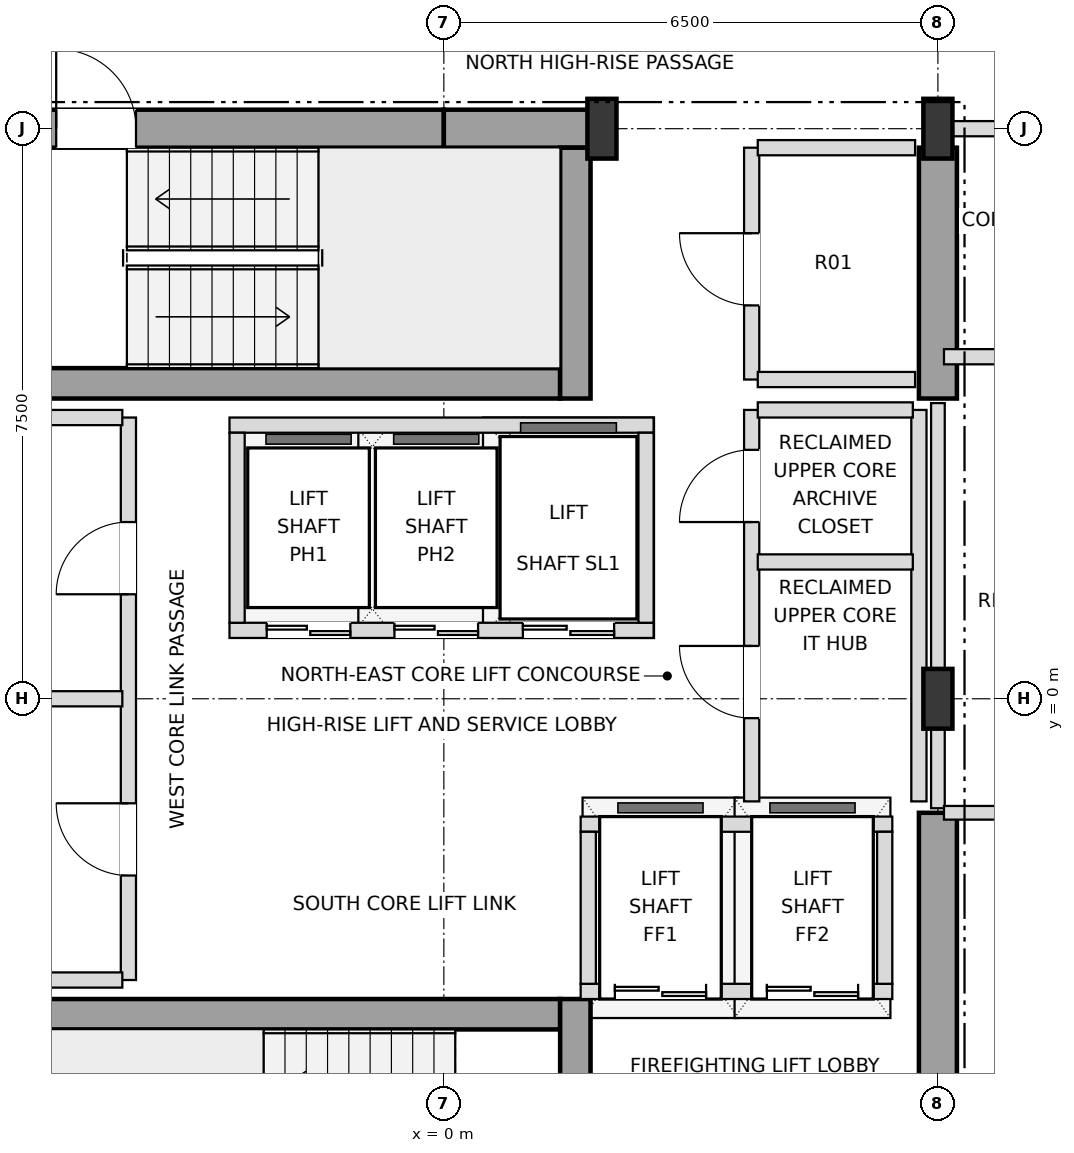
"""IFC4 building model, lengths in metres.
Left out: names, types, materials, properties, quantities, classifications, styles, units other than length and angle.
Written with IfcOpenShell. Run it as: python <this file> out.ifc"""

import sys

from ifc_helpers import new_model, si_unit, direction, frame, frame_2d, origin, origin_2d, place, context, subcontext, project, spatial, rectangle, i_section, extrude, element, fill, save


model = new_model("IFC4")
c1 = context("Model", 3, precision=1e-05, world=origin(), true_north=direction((0.0, 1.0)))
c2 = subcontext(c1, "Body", "Model", "MODEL_VIEW")
j1 = project(units=[si_unit("LENGTHUNIT", "METRE"), si_unit("PLANEANGLEUNIT", "RADIAN")], contexts=[c1])
p1 = place(None, origin())
s1 = spatial("IfcSite", under=j1, at=p1, CompositionType="ELEMENT")
p2 = place(p1, origin())
s2 = spatial("IfcBuilding", under=s1, at=p2, CompositionType="ELEMENT")
p3 = place(p2, frame((0.0, 0.0, 258.3)))
s3 = spatial("IfcBuildingStorey", under=s2, at=p3, CompositionType="ELEMENT", Elevation=258.3)
for number, where, z_axis, x_axis in (
    (1, (6.5, 0.0, 0.0), (0.0, 0.0, 1.0), (1.0, 0.0, 0.0)),
    (2, (2.08, 7.5, 0.0), (0.0, 0.0, 1.0), (1.0, 0.0, 0.0)),
    (3, (6.5, 7.5, 0.0), (0.0, 0.0, 1.0), (1.0, 0.0, 0.0)),
):
    element("IfcColumn", number, at=place(p3, frame(where, z_axis=z_axis, x_axis=x_axis)), inside=s3, PredefinedType="COLUMN", context=c2, shape_type="SweptSolid", body=[
        extrude(i_section(OverallWidth=0.382, OverallDepth=0.786, WebThickness=0.02, FlangeThickness=0.033, at=origin_2d()), origin(), (0.0, 0.0, 1.0), 3.6),
    ])
p4 = place(p3, frame((-6.75, 7.5, 0.0), z_axis=(0.0, 0.0, 1.0), x_axis=(1.0, 0.0, 0.0)))
e4 = element("IfcWall", 4, at=p4, inside=s3, PredefinedType="SHEAR", context=c2, shape_type="SweptSolid", body=[
    extrude(rectangle(XDim=6.75, YDim=0.5, at=frame_2d((3.375, 0.0))), origin(), (0.0, 0.0, 1.0), 3.38),
])
p5 = place(p4, frame((1.65, 0.0, 0.0)))
e5 = element("IfcOpeningElement", 5, at=p5, cuts=e4, PredefinedType="OPENING", context=c2, shape_type="SweptSolid", body=[
    extrude(rectangle(XDim=1.05, YDim=2.15, at=frame_2d((0.525, 1.075))), frame((0.0, 0.26, 0.0), z_axis=(0.0, -1.0, 0.0), x_axis=(1.0, 0.0, 0.0)), (0.0, 0.0, 1.0), 0.52),
])
p6 = place(p3, frame((0.0, 7.5, 0.0), z_axis=(0.0, 0.0, 1.0), x_axis=(1.0, 0.0, 0.0)))
e6 = element("IfcWall", 6, at=p6, inside=s3, PredefinedType="SHEAR", context=c2, shape_type="SweptSolid", body=[
    extrude(rectangle(XDim=2.08, YDim=0.5, at=frame_2d((1.04, 0.0))), origin(), (0.0, 0.0, 1.0), 3.38),
])
p7 = place(p3, frame((6.5, -7.25, 0.0), z_axis=(0.0, 0.0, 1.0), x_axis=(0.0, 1.0, 0.0)))
e7 = element("IfcWall", 7, at=p7, inside=s3, PredefinedType="SHEAR", context=c2, shape_type="SweptSolid", body=[
    extrude(rectangle(XDim=5.75, YDim=0.5, at=frame_2d((2.875, 0.0))), origin(), (0.0, 0.0, 1.0), 3.38),
])
p8 = place(p7, frame((0.85, 0.0, 0.0)))
e8 = element("IfcOpeningElement", 8, at=p8, cuts=e7, PredefinedType="OPENING", context=c2, shape_type="SweptSolid", body=[
    extrude(rectangle(XDim=1.05, YDim=2.15, at=frame_2d((0.525, 1.075))), frame((0.0, 0.26, 0.0), z_axis=(0.0, -1.0, 0.0), x_axis=(1.0, 0.0, 0.0)), (0.0, 0.0, 1.0), 0.52),
])
p9 = place(p3, frame((6.5, 3.95, 0.0), z_axis=(0.0, 0.0, 1.0), x_axis=(0.0, 1.0, 0.0)))
e9 = element("IfcWall", 9, at=p9, inside=s3, PredefinedType="SHEAR", context=c2, shape_type="SweptSolid", body=[
    extrude(rectangle(XDim=3.3, YDim=0.5, at=frame_2d((1.65, 0.0))), origin(), (0.0, 0.0, 1.0), 3.38),
])
p10 = place(p3, frame((-6.25, -4.15, 0.0), z_axis=(0.0, 0.0, 1.0), x_axis=(1.0, 0.0, 0.0)))
e10 = element("IfcWall", 10, at=p10, inside=s3, PredefinedType="SHEAR", context=c2, shape_type="SweptSolid", body=[
    extrude(rectangle(XDim=7.78, YDim=0.4, at=frame_2d((3.89, 0.0))), origin(), (0.0, 0.0, 1.0), 3.38),
])
p11 = place(p3, frame((1.73, -7.25, 0.0), z_axis=(0.0, 0.0, 1.0), x_axis=(0.0, 1.0, 0.0)))
e11 = element("IfcWall", 11, at=p11, inside=s3, PredefinedType="SHEAR", context=c2, shape_type="SweptSolid", body=[
    extrude(rectangle(XDim=3.3, YDim=0.4, at=frame_2d((1.65, 0.0))), origin(), (0.0, 0.0, 1.0), 3.38),
])
p12 = place(p11, frame((0.9, 0.0, 0.0)))
e12 = element("IfcOpeningElement", 12, at=p12, cuts=e11, PredefinedType="OPENING", context=c2, shape_type="SweptSolid", body=[
    extrude(rectangle(XDim=1.05, YDim=2.15, at=frame_2d((0.525, 1.075))), frame((0.0, 0.21, 0.0), z_axis=(0.0, -1.0, 0.0), x_axis=(1.0, 0.0, 0.0)), (0.0, 0.0, 1.0), 0.42),
])
p13 = place(p3, frame((-5.55, 4.15, 0.0), z_axis=(0.0, 0.0, 1.0), x_axis=(1.0, 0.0, 0.0)))
e13 = element("IfcWall", 13, at=p13, inside=s3, PredefinedType="SHEAR", context=c2, shape_type="SweptSolid", body=[
    extrude(rectangle(XDim=7.08, YDim=0.4, at=frame_2d((3.54, 0.0))), origin(), (0.0, 0.0, 1.0), 3.38),
])
p14 = place(p3, frame((1.73, 3.95, 0.0), z_axis=(0.0, 0.0, 1.0), x_axis=(0.0, 1.0, 0.0)))
e14 = element("IfcWall", 14, at=p14, inside=s3, PredefinedType="SHEAR", context=c2, shape_type="SweptSolid", body=[
    extrude(rectangle(XDim=3.3, YDim=0.4, at=frame_2d((1.65, 0.0))), origin(), (0.0, 0.0, 1.0), 3.38),
])
p15 = place(p3, frame((-2.82, 0.9, 0.0), z_axis=(0.0, 0.0, 1.0), x_axis=(1.0, 0.0, 0.0)))
e15 = element("IfcWall", 15, at=p15, inside=s3, PredefinedType="SOLIDWALL", context=c2, shape_type="SweptSolid", body=[
    extrude(rectangle(XDim=5.58, YDim=0.2, at=frame_2d((2.79, 0.0))), origin(), (0.0, 0.0, 1.0), 3.38),
])
p16 = place(p15, frame((0.49, 0.0, 0.0)))
e16 = element("IfcOpeningElement", 16, at=p16, cuts=e15, PredefinedType="OPENING", context=c2, shape_type="SweptSolid", body=[
    extrude(rectangle(XDim=1.1, YDim=2.15, at=frame_2d((0.55, 1.075))), frame((0.0, 0.11, 0.0), z_axis=(0.0, -1.0, 0.0), x_axis=(1.0, 0.0, 0.0)), (0.0, 0.0, 1.0), 0.22),
])
p17 = place(p15, frame((2.17, 0.0, 0.0)))
e17 = element("IfcOpeningElement", 17, at=p17, cuts=e15, PredefinedType="OPENING", context=c2, shape_type="SweptSolid", body=[
    extrude(rectangle(XDim=1.1, YDim=2.15, at=frame_2d((0.55, 1.075))), frame((0.0, 0.11, 0.0), z_axis=(0.0, -1.0, 0.0), x_axis=(1.0, 0.0, 0.0)), (0.0, 0.0, 1.0), 0.22),
])
p18 = place(p15, frame((3.86, 0.0, 0.0)))
e18 = element("IfcOpeningElement", 18, at=p18, cuts=e15, PredefinedType="OPENING", context=c2, shape_type="SweptSolid", body=[
    extrude(rectangle(XDim=1.2, YDim=2.2, at=frame_2d((0.6, 1.1))), frame((0.0, 0.11, 0.0), z_axis=(0.0, -1.0, 0.0), x_axis=(1.0, 0.0, 0.0)), (0.0, 0.0, 1.0), 0.22),
])
p19 = place(p3, frame((-2.82, 3.6, 0.0), z_axis=(0.0, 0.0, 1.0), x_axis=(1.0, 0.0, 0.0)))
e19 = element("IfcWall", 19, at=p19, inside=s3, PredefinedType="SOLIDWALL", context=c2, shape_type="SweptSolid", body=[
    extrude(rectangle(XDim=5.58, YDim=0.2, at=frame_2d((2.79, 0.0))), origin(), (0.0, 0.0, 1.0), 3.38),
])
for number, where, z_axis, x_axis in (
    (20, (-2.72, 1.0, 0.0), (0.0, 0.0, 1.0), (0.0, 1.0, 0.0)),
    (21, (2.66, 1.0, 0.0), (0.0, 0.0, 1.0), (0.0, 1.0, 0.0)),
):
    element("IfcWall", number, at=place(p3, frame(where, z_axis=z_axis, x_axis=x_axis)), inside=s3, PredefinedType="SOLIDWALL", context=c2, shape_type="SweptSolid", body=[
        extrude(rectangle(XDim=2.5, YDim=0.2, at=frame_2d((1.25, 0.0))), origin(), (0.0, 0.0, 1.0), 3.38),
    ])
p20 = place(p3, frame((1.8, -3.85, 0.0), z_axis=(0.0, 0.0, 1.0), x_axis=(1.0, 0.0, 0.0)))
e22 = element("IfcWall", 22, at=p20, inside=s3, PredefinedType="SOLIDWALL", context=c2, shape_type="SweptSolid", body=[
    extrude(rectangle(XDim=4.1, YDim=0.2, at=frame_2d((2.05, 0.0))), origin(), (0.0, 0.0, 1.0), 3.38),
])
p21 = place(p20, frame((0.45, 0.0, 0.0)))
e23 = element("IfcOpeningElement", 23, at=p21, cuts=e22, PredefinedType="OPENING", context=c2, shape_type="SweptSolid", body=[
    extrude(rectangle(XDim=1.2, YDim=2.2, at=frame_2d((0.6, 1.1))), frame((0.0, 0.11, 0.0), z_axis=(0.0, -1.0, 0.0), x_axis=(1.0, 0.0, 0.0)), (0.0, 0.0, 1.0), 0.22),
])
p22 = place(p20, frame((2.45, 0.0, 0.0)))
e24 = element("IfcOpeningElement", 24, at=p22, cuts=e22, PredefinedType="OPENING", context=c2, shape_type="SweptSolid", body=[
    extrude(rectangle(XDim=1.2, YDim=2.2, at=frame_2d((0.6, 1.1))), frame((0.0, 0.11, 0.0), z_axis=(0.0, -1.0, 0.0), x_axis=(1.0, 0.0, 0.0)), (0.0, 0.0, 1.0), 0.22),
])
p23 = place(p3, frame((1.8, -1.65, 0.0), z_axis=(0.0, 0.0, 1.0), x_axis=(1.0, 0.0, 0.0)))
e25 = element("IfcWall", 25, at=p23, inside=s3, PredefinedType="SOLIDWALL", context=c2, shape_type="SweptSolid", body=[
    extrude(rectangle(XDim=4.1, YDim=0.2, at=frame_2d((2.05, 0.0))), origin(), (0.0, 0.0, 1.0), 3.38),
])
for number, where, z_axis, x_axis in (
    (26, (1.9, -3.75, 0.0), (0.0, 0.0, 1.0), (0.0, 1.0, 0.0)),
    (27, (5.8, -3.75, 0.0), (0.0, 0.0, 1.0), (0.0, 1.0, 0.0)),
):
    element("IfcWall", number, at=place(p3, frame(where, z_axis=z_axis, x_axis=x_axis)), inside=s3, PredefinedType="SOLIDWALL", context=c2, shape_type="SweptSolid", body=[
        extrude(rectangle(XDim=2.0, YDim=0.2, at=frame_2d((1.0, 0.0))), origin(), (0.0, 0.0, 1.0), 3.38),
    ])
p24 = place(p3, frame((-4.15, -3.7, 0.0), z_axis=(0.0, 0.0, 1.0), x_axis=(0.0, 1.0, 0.0)))
e28 = element("IfcWall", 28, at=p24, inside=s3, PredefinedType="SOLIDWALL", context=c2, shape_type="SweptSolid", body=[
    extrude(rectangle(XDim=7.4, YDim=0.2, at=frame_2d((3.7, 0.0))), origin(), (0.0, 0.0, 1.0), 3.38),
])
p25 = place(p24, frame((1.375, 0.0, 0.0)))
e29 = element("IfcOpeningElement", 29, at=p25, cuts=e28, PredefinedType="OPENING", context=c2, shape_type="SweptSolid", body=[
    extrude(rectangle(XDim=0.95, YDim=2.15, at=frame_2d((0.475, 1.075))), frame((0.0, 0.11, 0.0), z_axis=(0.0, -1.0, 0.0), x_axis=(1.0, 0.0, 0.0)), (0.0, 0.0, 1.0), 0.22),
])
p26 = place(p24, frame((5.075, 0.0, 0.0)))
e30 = element("IfcOpeningElement", 30, at=p26, cuts=e28, PredefinedType="OPENING", context=c2, shape_type="SweptSolid", body=[
    extrude(rectangle(XDim=0.95, YDim=2.15, at=frame_2d((0.475, 1.075))), frame((0.0, 0.11, 0.0), z_axis=(0.0, -1.0, 0.0), x_axis=(1.0, 0.0, 0.0)), (0.0, 0.0, 1.0), 0.22),
])
p27 = place(p3, frame((4.05, -1.35, 0.0), z_axis=(0.0, 0.0, 1.0), x_axis=(0.0, 1.0, 0.0)))
e31 = element("IfcWall", 31, at=p27, inside=s3, PredefinedType="SOLIDWALL", context=c2, shape_type="SweptSolid", body=[
    extrude(rectangle(XDim=5.15, YDim=0.2, at=frame_2d((2.575, 0.0))), origin(), (0.0, 0.0, 1.0), 3.38),
])
p28 = place(p27, frame((1.095, 0.0, 0.0)))
e32 = element("IfcOpeningElement", 32, at=p28, cuts=e31, PredefinedType="OPENING", context=c2, shape_type="SweptSolid", body=[
    extrude(rectangle(XDim=0.95, YDim=2.15, at=frame_2d((0.475, 1.075))), frame((0.0, 0.11, 0.0), z_axis=(0.0, -1.0, 0.0), x_axis=(1.0, 0.0, 0.0)), (0.0, 0.0, 1.0), 0.22),
])
p29 = place(p27, frame((3.675, 0.0, 0.0)))
e33 = element("IfcOpeningElement", 33, at=p29, cuts=e31, PredefinedType="OPENING", context=c2, shape_type="SweptSolid", body=[
    extrude(rectangle(XDim=0.95, YDim=2.15, at=frame_2d((0.475, 1.075))), frame((0.0, 0.11, 0.0), z_axis=(0.0, -1.0, 0.0), x_axis=(1.0, 0.0, 0.0)), (0.0, 0.0, 1.0), 0.22),
])
p30 = place(p3, frame((4.05, 4.2, 0.0), z_axis=(0.0, 0.0, 1.0), x_axis=(0.0, 1.0, 0.0)))
e34 = element("IfcWall", 34, at=p30, inside=s3, PredefinedType="SOLIDWALL", context=c2, shape_type="SweptSolid", body=[
    extrude(rectangle(XDim=3.05, YDim=0.2, at=frame_2d((1.525, 0.0))), origin(), (0.0, 0.0, 1.0), 3.38),
])
p31 = place(p30, frame((0.975, 0.0, 0.0)))
e35 = element("IfcOpeningElement", 35, at=p31, cuts=e34, PredefinedType="OPENING", context=c2, shape_type="SweptSolid", body=[
    extrude(rectangle(XDim=0.95, YDim=2.15, at=frame_2d((0.475, 1.075))), frame((0.0, 0.11, 0.0), z_axis=(0.0, -1.0, 0.0), x_axis=(1.0, 0.0, 0.0)), (0.0, 0.0, 1.0), 0.22),
])
p32 = place(p3, frame((6.25, -1.35, 0.0), z_axis=(0.0, 0.0, 1.0), x_axis=(0.0, 1.0, 0.0)))
e36 = element("IfcWall", 36, at=p32, inside=s3, PredefinedType="SOLIDWALL", context=c2, shape_type="SweptSolid", body=[
    extrude(rectangle(XDim=5.15, YDim=0.2, at=frame_2d((2.575, 0.0))), origin(), (0.0, 0.0, 1.0), 3.38),
])
p33 = place(p3, frame((6.5, -1.44, 0.0), z_axis=(0.0, 0.0, 1.0), x_axis=(0.0, 1.0, 0.0)))
e37 = element("IfcWall", 37, at=p33, inside=s3, PredefinedType="PARTITIONING", context=c2, shape_type="SweptSolid", body=[
    extrude(rectangle(XDim=5.33, YDim=0.18, at=frame_2d((2.665, 0.0))), origin(), (0.0, 0.0, 1.0), 2.826),
])
p34 = place(p3, frame((-6.17, -3.7, 0.0), z_axis=(0.0, 0.0, 1.0), x_axis=(1.0, 0.0, 0.0)))
e38 = element("IfcWall", 38, at=p34, inside=s3, PredefinedType="SOLIDWALL", context=c2, shape_type="SweptSolid", body=[
    extrude(rectangle(XDim=1.94, YDim=0.2, at=frame_2d((0.97, 0.0))), origin(), (0.0, 0.0, 1.0), 3.38),
])
p35 = place(p3, frame((6.58, -1.5, 0.0), z_axis=(0.0, 0.0, 1.0), x_axis=(1.0, 0.0, 0.0)))
e39 = element("IfcWall", 39, at=p35, inside=s3, PredefinedType="PARTITIONING", context=c2, shape_type="SweptSolid", body=[
    extrude(rectangle(XDim=1.64, YDim=0.18, at=frame_2d((0.82, 0.0))), origin(), (0.0, 0.0, 1.0), 3.38),
])
p36 = place(p3, frame((-6.17, 0.0, 0.0), z_axis=(0.0, 0.0, 1.0), x_axis=(1.0, 0.0, 0.0)))
e40 = element("IfcWall", 40, at=p36, inside=s3, PredefinedType="SOLIDWALL", context=c2, shape_type="SweptSolid", body=[
    extrude(rectangle(XDim=1.94, YDim=0.2, at=frame_2d((0.97, 0.0))), origin(), (0.0, 0.0, 1.0), 3.38),
])
p37 = place(p3, frame((4.13, 1.8, 0.0), z_axis=(0.0, 0.0, 1.0), x_axis=(1.0, 0.0, 0.0)))
e41 = element("IfcWall", 41, at=p37, inside=s3, PredefinedType="SOLIDWALL", context=c2, shape_type="SweptSolid", body=[
    extrude(rectangle(XDim=2.04, YDim=0.2, at=frame_2d((1.02, 0.0))), origin(), (0.0, 0.0, 1.0), 3.38),
])
p38 = place(p3, frame((-6.17, 3.7, 0.0), z_axis=(0.0, 0.0, 1.0), x_axis=(1.0, 0.0, 0.0)))
e42 = element("IfcWall", 42, at=p38, inside=s3, PredefinedType="SOLIDWALL", context=c2, shape_type="SweptSolid", body=[
    extrude(rectangle(XDim=1.94, YDim=0.2, at=frame_2d((0.97, 0.0))), origin(), (0.0, 0.0, 1.0), 3.38),
])
p39 = place(p3, frame((4.13, 3.8, 0.0), z_axis=(0.0, 0.0, 1.0), x_axis=(1.0, 0.0, 0.0)))
e43 = element("IfcWall", 43, at=p39, inside=s3, PredefinedType="SOLIDWALL", context=c2, shape_type="SweptSolid", body=[
    extrude(rectangle(XDim=2.04, YDim=0.2, at=frame_2d((1.02, 0.0))), origin(), (0.0, 0.0, 1.0), 3.38),
])
p40 = place(p3, frame((4.13, 4.2, 0.0), z_axis=(0.0, 0.0, 1.0), x_axis=(1.0, 0.0, 0.0)))
e44 = element("IfcWall", 44, at=p40, inside=s3, PredefinedType="SOLIDWALL", context=c2, shape_type="SweptSolid", body=[
    extrude(rectangle(XDim=2.07, YDim=0.2, at=frame_2d((1.035, 0.0))), origin(), (0.0, 0.0, 1.0), 3.38),
])
p41 = place(p3, frame((6.58, 4.5, 0.0), z_axis=(0.0, 0.0, 1.0), x_axis=(1.0, 0.0, 0.0)))
e45 = element("IfcWall", 45, at=p41, inside=s3, PredefinedType="SOLIDWALL", context=c2, shape_type="SweptSolid", body=[
    extrude(rectangle(XDim=4.74, YDim=0.2, at=frame_2d((2.37, 0.0))), origin(), (0.0, 0.0, 1.0), 3.38),
])
p42 = place(p41, frame((1.845, 0.0, 0.0)))
e46 = element("IfcOpeningElement", 46, at=p42, cuts=e45, PredefinedType="OPENING", context=c2, shape_type="SweptSolid", body=[
    extrude(rectangle(XDim=0.95, YDim=2.15, at=frame_2d((0.475, 1.075))), frame((0.0, 0.11, 0.0), z_axis=(0.0, -1.0, 0.0), x_axis=(1.0, 0.0, 0.0)), (0.0, 0.0, 1.0), 0.22),
])
p43 = place(p3, frame((4.13, 7.25, 0.0), z_axis=(0.0, 0.0, 1.0), x_axis=(1.0, 0.0, 0.0)))
e47 = element("IfcWall", 47, at=p43, inside=s3, PredefinedType="SOLIDWALL", context=c2, shape_type="SweptSolid", body=[
    extrude(rectangle(XDim=2.07, YDim=0.2, at=frame_2d((1.035, 0.0))), origin(), (0.0, 0.0, 1.0), 3.38),
])
p44 = place(p3, frame((6.5, 7.5, 0.0), z_axis=(0.0, 0.0, 1.0), x_axis=(1.0, 0.0, 0.0)))
e48 = element("IfcWall", 48, at=p44, inside=s3, PredefinedType="SOLIDWALL", context=c2, shape_type="SweptSolid", body=[
    extrude(rectangle(XDim=4.82, YDim=0.2, at=frame_2d((2.41, 0.0))), origin(), (0.0, 0.0, 1.0), 2.826),
])
p45 = place(p5, origin())
e49 = element("IfcDoor", 49, at=p45, inside=s3, OperationType="SINGLE_SWING_LEFT", PredefinedType="DOOR", context=c2, shape_type="SweptSolid", body=[
    extrude(rectangle(XDim=1.05, YDim=2.15, at=frame_2d((0.525, 1.075))), frame((0.0, 0.025, 0.0), z_axis=(0.0, -1.0, 0.0), x_axis=(1.0, 0.0, 0.0)), (0.0, 0.0, 1.0), 0.05),
])
fill(e5, e49)
p46 = place(p16, origin())
e50 = element("IfcDoor", 50, at=p46, inside=s3, OperationType="DOUBLE_DOOR_SLIDING", PredefinedType="DOOR", context=c2, shape_type="SweptSolid", body=[
    extrude(rectangle(XDim=1.1, YDim=2.15, at=frame_2d((0.55, 1.075))), frame((0.0, 0.025, 0.0), z_axis=(0.0, -1.0, 0.0), x_axis=(1.0, 0.0, 0.0)), (0.0, 0.0, 1.0), 0.05),
])
fill(e16, e50)
p47 = place(p17, origin())
e51 = element("IfcDoor", 51, at=p47, inside=s3, OperationType="DOUBLE_DOOR_SLIDING", PredefinedType="DOOR", context=c2, shape_type="SweptSolid", body=[
    extrude(rectangle(XDim=1.1, YDim=2.15, at=frame_2d((0.55, 1.075))), frame((0.0, 0.025, 0.0), z_axis=(0.0, -1.0, 0.0), x_axis=(1.0, 0.0, 0.0)), (0.0, 0.0, 1.0), 0.05),
])
fill(e17, e51)
p48 = place(p18, origin())
e52 = element("IfcDoor", 52, at=p48, inside=s3, OperationType="DOUBLE_DOOR_SLIDING", PredefinedType="DOOR", context=c2, shape_type="SweptSolid", body=[
    extrude(rectangle(XDim=1.2, YDim=2.2, at=frame_2d((0.6, 1.1))), frame((0.0, 0.025, 0.0), z_axis=(0.0, -1.0, 0.0), x_axis=(1.0, 0.0, 0.0)), (0.0, 0.0, 1.0), 0.05),
])
fill(e18, e52)
p49 = place(p21, origin())
e53 = element("IfcDoor", 53, at=p49, inside=s3, OperationType="DOUBLE_DOOR_SLIDING", PredefinedType="DOOR", context=c2, shape_type="SweptSolid", body=[
    extrude(rectangle(XDim=1.2, YDim=2.2, at=frame_2d((0.6, 1.1))), frame((0.0, 0.025, 0.0), z_axis=(0.0, -1.0, 0.0), x_axis=(1.0, 0.0, 0.0)), (0.0, 0.0, 1.0), 0.05),
])
fill(e23, e53)
p50 = place(p22, origin())
e54 = element("IfcDoor", 54, at=p50, inside=s3, OperationType="DOUBLE_DOOR_SLIDING", PredefinedType="DOOR", context=c2, shape_type="SweptSolid", body=[
    extrude(rectangle(XDim=1.2, YDim=2.2, at=frame_2d((0.6, 1.1))), frame((0.0, 0.025, 0.0), z_axis=(0.0, -1.0, 0.0), x_axis=(1.0, 0.0, 0.0)), (0.0, 0.0, 1.0), 0.05),
])
fill(e24, e54)
p51 = place(p25, origin())
e55 = element("IfcDoor", 55, at=p51, inside=s3, OperationType="SINGLE_SWING_RIGHT", PredefinedType="DOOR", context=c2, shape_type="SweptSolid", body=[
    extrude(rectangle(XDim=0.95, YDim=2.15, at=frame_2d((0.475, 1.075))), frame((0.0, 0.025, 0.0), z_axis=(0.0, -1.0, 0.0), x_axis=(1.0, 0.0, 0.0)), (0.0, 0.0, 1.0), 0.05),
])
fill(e29, e55)
p52 = place(p26, origin())
e56 = element("IfcDoor", 56, at=p52, inside=s3, OperationType="SINGLE_SWING_LEFT", PredefinedType="DOOR", context=c2, shape_type="SweptSolid", body=[
    extrude(rectangle(XDim=0.95, YDim=2.15, at=frame_2d((0.475, 1.075))), frame((0.0, 0.025, 0.0), z_axis=(0.0, -1.0, 0.0), x_axis=(1.0, 0.0, 0.0)), (0.0, 0.0, 1.0), 0.05),
])
fill(e30, e56)
p53 = place(p28, origin())
e57 = element("IfcDoor", 57, at=p53, inside=s3, OperationType="SINGLE_SWING_RIGHT", PredefinedType="DOOR", context=c2, shape_type="SweptSolid", body=[
    extrude(rectangle(XDim=0.95, YDim=2.15, at=frame_2d((0.475, 1.075))), frame((0.0, 0.025, 0.0), z_axis=(0.0, -1.0, 0.0), x_axis=(1.0, 0.0, 0.0)), (0.0, 0.0, 1.0), 0.05),
])
fill(e32, e57)
p54 = place(p29, origin())
e58 = element("IfcDoor", 58, at=p54, inside=s3, OperationType="SINGLE_SWING_LEFT", PredefinedType="DOOR", context=c2, shape_type="SweptSolid", body=[
    extrude(rectangle(XDim=0.95, YDim=2.15, at=frame_2d((0.475, 1.075))), frame((0.0, 0.025, 0.0), z_axis=(0.0, -1.0, 0.0), x_axis=(1.0, 0.0, 0.0)), (0.0, 0.0, 1.0), 0.05),
])
fill(e33, e58)
p55 = place(p31, origin())
e59 = element("IfcDoor", 59, at=p55, inside=s3, OperationType="SINGLE_SWING_RIGHT", PredefinedType="DOOR", context=c2, shape_type="SweptSolid", body=[
    extrude(rectangle(XDim=0.95, YDim=2.15, at=frame_2d((0.475, 1.075))), frame((0.0, 0.025, 0.0), z_axis=(0.0, -1.0, 0.0), x_axis=(1.0, 0.0, 0.0)), (0.0, 0.0, 1.0), 0.05),
])
fill(e35, e59)
save(model, sys.argv[1])
